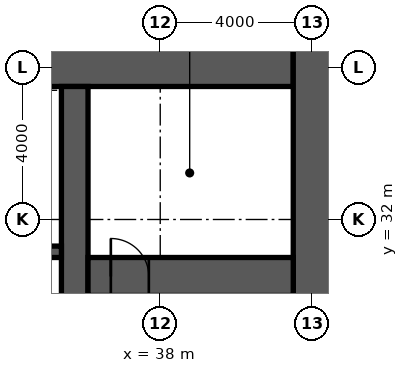
"""IFC4 building model, lengths in metres.
Left out: names, types, materials, properties, quantities, classifications, styles, units other than length and angle.
Written with IfcOpenShell. Run it as: python <this file> out.ifc"""

import sys

from ifc_helpers import new_model, si_unit, direction, frame, frame_2d, origin, place, context, subcontext, project, spatial, rectangle, extrude, element, fill, save


model = new_model("IFC4")
c1 = context("Model", 3, precision=1e-05, world=origin(), true_north=direction((0.0, 1.0)))
c2 = subcontext(c1, "Body", "Model", "MODEL_VIEW")
j1 = project(units=[si_unit("LENGTHUNIT", "METRE"), si_unit("PLANEANGLEUNIT", "RADIAN")], contexts=[c1])
p1 = place(None, origin())
s1 = spatial("IfcSite", under=j1, at=p1, CompositionType="ELEMENT")
p2 = place(p1, origin())
s2 = spatial("IfcBuilding", under=s1, at=p2, CompositionType="ELEMENT")
p3 = place(p2, frame((0.0, 0.0, 19.0)))
s3 = spatial("IfcBuildingStorey", under=s2, at=p3, CompositionType="ELEMENT", Elevation=19.0)
p4 = place(p3, frame((18.5, 36.2, -0.15), z_axis=(0.0, 0.0, 1.0), x_axis=(1.0, 0.0, 0.0)))
e1 = element("IfcWall", 1, at=p4, inside=s3, PredefinedType="SHEAR", context=c2, shape_type="SweptSolid", body=[
    extrude(rectangle(XDim=23.0, YDim=1.4, at=frame_2d((11.5, 0.0))), origin(), (0.0, 0.0, 1.0), 4.0),
])
p5 = place(p3, frame((42.0, 17.1, -0.15), z_axis=(0.0, 0.0, 1.0), x_axis=(0.0, 1.0, 0.0)))
e2 = element("IfcWall", 2, at=p5, inside=s3, PredefinedType="SHEAR", context=c2, shape_type="SweptSolid", body=[
    extrude(rectangle(XDim=19.8, YDim=1.0, at=frame_2d((9.9, 0.0))), origin(), (0.0, 0.0, 1.0), 4.0),
])
p6 = place(p3, frame((35.75, 18.5, -0.15), z_axis=(0.0, 0.0, 1.0), x_axis=(0.0, 1.0, 0.0)))
e3 = element("IfcWall", 3, at=p6, inside=s3, PredefinedType="SHEAR", context=c2, shape_type="SweptSolid", body=[
    extrude(rectangle(XDim=17.0, YDim=0.7, at=frame_2d((8.5, 0.0))), origin(), (0.0, 0.0, 1.0), 4.0),
])
p7 = place(p6, frame((9.85, 0.0, 0.15)))
e4 = element("IfcOpeningElement", 4, at=p7, cuts=e3, PredefinedType="OPENING", context=c2, shape_type="SweptSolid", body=[
    extrude(rectangle(XDim=1.0, YDim=2.2, at=frame_2d((0.5, 1.1))), frame((0.0, 0.36, 0.0), z_axis=(0.0, -1.0, 0.0), x_axis=(1.0, 0.0, 0.0)), (0.0, 0.0, 1.0), 0.72),
])
p8 = place(p3, frame((24.15, 31.15, -0.15), z_axis=(0.0, 0.0, 1.0), x_axis=(1.0, 0.0, 0.0)))
e5 = element("IfcWall", 5, at=p8, inside=s3, PredefinedType="SHEAR", context=c2, shape_type="SweptSolid", body=[
    extrude(rectangle(XDim=11.25, YDim=0.3, at=frame_2d((5.625, 0.0))), origin(), (0.0, 0.0, 1.0), 4.0),
])
p9 = place(p8, frame((7.25, 0.0, 0.15)))
e6 = element("IfcOpeningElement", 6, at=p9, cuts=e5, PredefinedType="OPENING", context=c2, shape_type="SweptSolid", body=[
    extrude(rectangle(XDim=1.4, YDim=2.4, at=frame_2d((0.7, 1.2))), frame((0.0, 0.16, 0.0), z_axis=(0.0, -1.0, 0.0), x_axis=(1.0, 0.0, 0.0)), (0.0, 0.0, 1.0), 0.32),
])
p10 = place(p3, frame((36.1, 30.5, -0.15), z_axis=(0.0, 0.0, 1.0), x_axis=(1.0, 0.0, 0.0)))
e7 = element("IfcWall", 7, at=p10, inside=s3, PredefinedType="SHEAR", context=c2, shape_type="SweptSolid", body=[
    extrude(rectangle(XDim=5.4, YDim=1.0, at=frame_2d((2.7, 0.0))), origin(), (0.0, 0.0, 1.0), 4.0),
])
p11 = place(p10, frame((0.6, 0.0, 0.15)))
e8 = element("IfcOpeningElement", 8, at=p11, cuts=e7, PredefinedType="OPENING", context=c2, shape_type="SweptSolid", body=[
    extrude(rectangle(XDim=1.0, YDim=2.2, at=frame_2d((0.5, 1.1))), frame((0.0, 0.51, 0.0), z_axis=(0.0, -1.0, 0.0), x_axis=(1.0, 0.0, 0.0)), (0.0, 0.0, 1.0), 1.02),
])
p12 = place(p11, origin())
e9 = element("IfcDoor", 9, at=p12, inside=s3, OperationType="SINGLE_SWING_LEFT", PredefinedType="DOOR", context=c2, shape_type="SweptSolid", body=[
    extrude(rectangle(XDim=1.0, YDim=2.2, at=frame_2d((0.5, 1.1))), frame((0.0, 0.025, 0.0), z_axis=(0.0, -1.0, 0.0), x_axis=(1.0, 0.0, 0.0)), (0.0, 0.0, 1.0), 0.05),
])
fill(e8, e9)
save(model, sys.argv[1])
